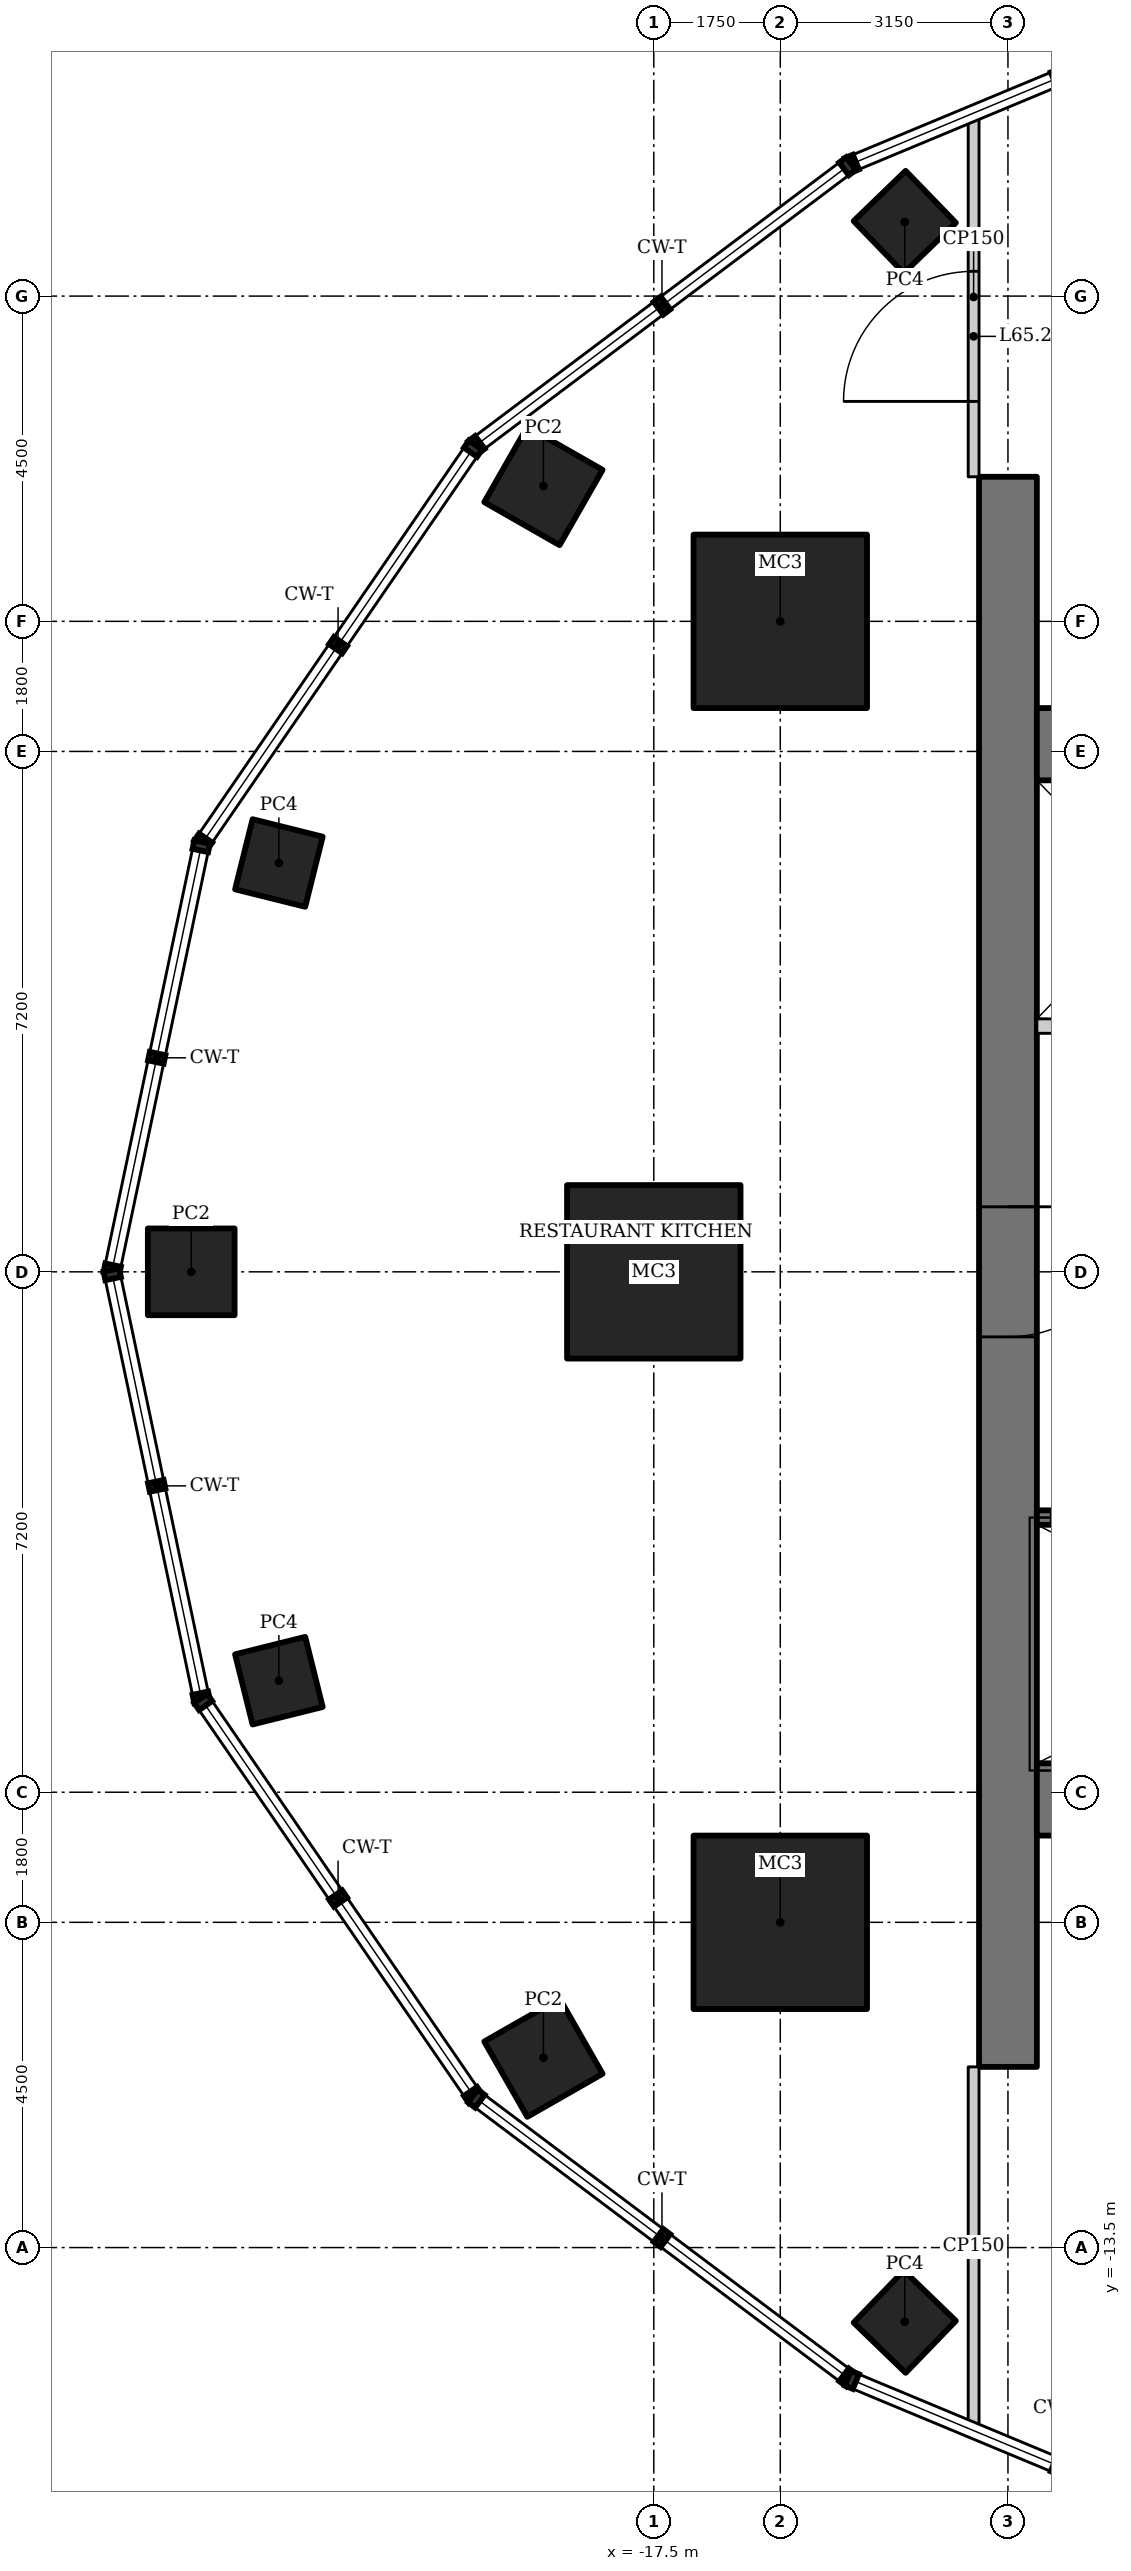
"""IFC4 building model, lengths in metres.
Left out: names, types, materials, properties, quantities, classifications, styles, units other than length and angle.
Written with IfcOpenShell. Run it as: python <this file> out.ifc"""

import sys

from ifc_helpers import new_model, si_unit, direction, frame, frame_2d, origin, origin_2d, place, context, subcontext, project, spatial, rectangle, hollow_rectangle, extrude, element, fill, save


model = new_model("IFC4")
c1 = context("Model", 3, precision=1e-05, world=origin(), true_north=direction((0.0, 1.0)))
c2 = subcontext(c1, "Body", "Model", "MODEL_VIEW")
j1 = project(units=[si_unit("LENGTHUNIT", "METRE"), si_unit("PLANEANGLEUNIT", "RADIAN")], contexts=[c1])
p1 = place(None, origin())
s1 = spatial("IfcSite", under=j1, at=p1, CompositionType="ELEMENT")
p2 = place(p1, origin())
s2 = spatial("IfcBuilding", under=s1, at=p2, CompositionType="ELEMENT")
p3 = place(p2, frame((0.0, 0.0, 279.4)))
s3 = spatial("IfcBuildingStorey", under=s2, at=p3, CompositionType="ELEMENT", Elevation=279.4)
for number, where, z_axis, x_axis in (
    (1, (-15.75, 9.0, 0.0), (0.0, 0.0, 1.0), (1.0, 0.0, 0.0)),
    (2, (-17.5, 0.0, 0.0), (0.0, 0.0, 1.0), (1.0, 0.0, 0.0)),
    (3, (-15.75, -9.0, 0.0), (0.0, 0.0, 1.0), (1.0, 0.0, 0.0)),
):
    element("IfcColumn", number, at=place(p3, frame(where, z_axis=z_axis, x_axis=x_axis)), inside=s3, PredefinedType="COLUMN", context=c2, shape_type="SweptSolid", body=[
        extrude(hollow_rectangle(XDim=2.4, YDim=2.4, WallThickness=0.12, at=origin_2d()), origin(), (0.0, 0.0, 1.0), 5.0),
    ])
p4 = place(p3, frame((-14.028, 14.526, 0.0), z_axis=(0.0, 0.0, 1.0), x_axis=(0.719339800339, 0.694658370459, 0.0)))
e4 = element("IfcColumn", 4, at=p4, inside=s3, PredefinedType="COLUMN", context=c2, shape_type="SweptSolid", body=[
    extrude(hollow_rectangle(XDim=1.0, YDim=1.0, WallThickness=0.08, at=origin_2d()), origin(), (0.0, 0.0, 1.0), 5.0),
])
p5 = place(p3, frame((-19.027, 10.873, 0.0), z_axis=(0.0, 0.0, 1.0), x_axis=(0.496139221777, 0.86824298017, 0.0)))
e5 = element("IfcColumn", 5, at=p5, inside=s3, PredefinedType="COLUMN", context=c2, shape_type="SweptSolid", body=[
    extrude(hollow_rectangle(XDim=1.2, YDim=1.2, WallThickness=0.1, at=origin_2d()), origin(), (0.0, 0.0, 1.0), 5.0),
])
p6 = place(p3, frame((-22.687, 5.656, 0.0), z_axis=(0.0, 0.0, 1.0), x_axis=(0.2419218956, 0.970295726276, 0.0)))
e6 = element("IfcColumn", 6, at=p6, inside=s3, PredefinedType="COLUMN", context=c2, shape_type="SweptSolid", body=[
    extrude(hollow_rectangle(XDim=1.0, YDim=1.0, WallThickness=0.08, at=origin_2d()), origin(), (0.0, 0.0, 1.0), 5.0),
])
p7 = place(p3, frame((-23.9, 0.0, 0.0), z_axis=(0.0, 0.0, 1.0), x_axis=(1.0, 0.0, 0.0)))
e7 = element("IfcColumn", 7, at=p7, inside=s3, PredefinedType="COLUMN", context=c2, shape_type="SweptSolid", body=[
    extrude(hollow_rectangle(XDim=1.2, YDim=1.2, WallThickness=0.1, at=origin_2d()), origin(), (0.0, 0.0, 1.0), 5.0),
])
p8 = place(p3, frame((-22.687, -5.656, 0.0), z_axis=(0.0, 0.0, 1.0), x_axis=(0.970295726276, 0.2419218956, 0.0)))
e8 = element("IfcColumn", 8, at=p8, inside=s3, PredefinedType="COLUMN", context=c2, shape_type="SweptSolid", body=[
    extrude(hollow_rectangle(XDim=1.0, YDim=1.0, WallThickness=0.08, at=origin_2d()), origin(), (0.0, 0.0, 1.0), 5.0),
])
p9 = place(p3, frame((-19.027, -10.873, 0.0), z_axis=(0.0, 0.0, 1.0), x_axis=(0.86824298017, 0.496139221777, 0.0)))
e9 = element("IfcColumn", 9, at=p9, inside=s3, PredefinedType="COLUMN", context=c2, shape_type="SweptSolid", body=[
    extrude(hollow_rectangle(XDim=1.2, YDim=1.2, WallThickness=0.1, at=origin_2d()), origin(), (0.0, 0.0, 1.0), 5.0),
])
p10 = place(p3, frame((-14.028, -14.526, 0.0), z_axis=(0.0, 0.0, 1.0), x_axis=(0.694658370459, 0.719339800339, 0.0)))
e10 = element("IfcColumn", 10, at=p10, inside=s3, PredefinedType="COLUMN", context=c2, shape_type="SweptSolid", body=[
    extrude(hollow_rectangle(XDim=1.0, YDim=1.0, WallThickness=0.08, at=origin_2d()), origin(), (0.0, 0.0, 1.0), 5.0),
])
p11 = place(p3, frame((-12.6, 11.0, 0.0), z_axis=(0.0, 0.0, 1.0), x_axis=(0.0, -1.0, 0.0)))
e11 = element("IfcWall", 11, at=p11, inside=s3, PredefinedType="SHEAR", context=c2, shape_type="SweptSolid", body=[
    extrude(rectangle(XDim=22.0, YDim=0.8, at=frame_2d((11.0, 0.0))), origin(), (0.0, 0.0, 1.0), 5.0),
])
p12 = place(p11, frame((10.1, 0.0, 0.0)))
e12 = element("IfcOpeningElement", 12, at=p12, cuts=e11, PredefinedType="OPENING", context=c2, shape_type="SweptSolid", body=[
    extrude(rectangle(XDim=1.8, YDim=2.1, at=frame_2d((0.9, 1.05))), frame((0.0, 0.41, 0.0), z_axis=(0.0, -1.0, 0.0), x_axis=(1.0, 0.0, 0.0)), (0.0, 0.0, 1.0), 0.82),
])
p13 = place(p3, frame((-12.2, -7.3, 0.0), z_axis=(0.0, 0.0, 1.0), x_axis=(1.0, 0.0, 0.0)))
e13 = element("IfcWall", 13, at=p13, inside=s3, PredefinedType="SHEAR", context=c2, shape_type="SweptSolid", body=[
    extrude(rectangle(XDim=24.4, YDim=1.0, at=frame_2d((12.2, 0.0))), origin(), (0.0, 0.0, 1.0), 5.0),
])
p14 = place(p3, frame((-5.6, 7.3, 0.0), z_axis=(0.0, 0.0, 1.0), x_axis=(-1.0, 0.0, 0.0)))
e14 = element("IfcWall", 14, at=p14, inside=s3, PredefinedType="SHEAR", context=c2, shape_type="SweptSolid", body=[
    extrude(rectangle(XDim=6.6, YDim=1.0, at=frame_2d((3.3, 0.0))), origin(), (0.0, 0.0, 1.0), 5.0),
])
p15 = place(p3, frame((-5.6, -3.4, 0.0), z_axis=(0.0, 0.0, 1.0), x_axis=(-1.0, 0.0, 0.0)))
e15 = element("IfcWall", 15, at=p15, inside=s3, PredefinedType="SHEAR", context=c2, shape_type="SweptSolid", body=[
    extrude(rectangle(XDim=6.6, YDim=0.2, at=frame_2d((3.3, 0.0))), origin(), (0.0, 0.0, 1.0), 5.0),
])
p16 = place(p15, frame((5.2, 0.0, 0.0)))
e16 = element("IfcOpeningElement", 16, at=p16, cuts=e15, PredefinedType="OPENING", context=c2, shape_type="SweptSolid", body=[
    extrude(rectangle(XDim=1.2, YDim=2.1, at=frame_2d((0.6, 1.05))), frame((0.0, 0.11, 0.0), z_axis=(0.0, -1.0, 0.0), x_axis=(1.0, 0.0, 0.0)), (0.0, 0.0, 1.0), 0.22),
])
p17 = place(p3, frame((-12.2, 3.4, 0.0), z_axis=(0.0, 0.0, 1.0), x_axis=(1.0, 0.0, 0.0)))
e17 = element("IfcWall", 17, at=p17, inside=s3, PredefinedType="SOLIDWALL", context=c2, shape_type="SweptSolid", body=[
    extrude(rectangle(XDim=6.6, YDim=0.2, at=frame_2d((3.3, 0.0))), origin(), (0.0, 0.0, 1.0), 5.0),
])
p18 = place(p17, frame((1.05, 0.0, 0.0)))
e18 = element("IfcOpeningElement", 18, at=p18, cuts=e17, PredefinedType="OPENING", context=c2, shape_type="SweptSolid", body=[
    extrude(rectangle(XDim=1.1, YDim=2.2, at=frame_2d((0.55, 1.1))), frame((0.0, 0.11, 0.0), z_axis=(0.0, -1.0, 0.0), x_axis=(1.0, 0.0, 0.0)), (0.0, 0.0, 1.0), 0.22),
])
p19 = place(p17, frame((4.3, 0.0, 0.0)))
e19 = element("IfcOpeningElement", 19, at=p19, cuts=e17, PredefinedType="OPENING", context=c2, shape_type="SweptSolid", body=[
    extrude(rectangle(XDim=1.4, YDim=2.2, at=frame_2d((0.7, 1.1))), frame((0.0, 0.11, 0.0), z_axis=(0.0, -1.0, 0.0), x_axis=(1.0, 0.0, 0.0)), (0.0, 0.0, 1.0), 0.22),
])
p20 = place(p3, frame((-13.075, -11.0, 0.0), z_axis=(0.0, 0.0, 1.0), x_axis=(0.0, -1.0, 0.0)))
e20 = element("IfcWall", 20, at=p20, inside=s3, PredefinedType="PARTITIONING", context=c2, shape_type="SweptSolid", body=[
    extrude(rectangle(XDim=4.974, YDim=0.15, at=frame_2d((2.487, 0.0))), origin(), (0.0, 0.0, 1.0), 4.8),
])
p21 = place(p3, frame((-13.075, 11.0, 0.0), z_axis=(0.0, 0.0, 1.0), x_axis=(0.0, 1.0, 0.0)))
e21 = element("IfcWall", 21, at=p21, inside=s3, PredefinedType="PARTITIONING", context=c2, shape_type="SweptSolid", body=[
    extrude(rectangle(XDim=4.974, YDim=0.15, at=frame_2d((2.487, 0.0))), origin(), (0.0, 0.0, 1.0), 4.8),
])
p22 = place(p21, frame((1.043, 0.0, 0.0)))
e22 = element("IfcOpeningElement", 22, at=p22, cuts=e21, PredefinedType="OPENING", context=c2, shape_type="SweptSolid", body=[
    extrude(rectangle(XDim=1.8, YDim=2.1, at=frame_2d((0.9, 1.05))), frame((0.0, 0.085, 0.0), z_axis=(0.0, -1.0, 0.0), x_axis=(1.0, 0.0, 0.0)), (0.0, 0.0, 1.0), 0.17),
])
p23 = place(p16, origin())
e23 = element("IfcDoor", 23, at=p23, inside=s3, OperationType="SINGLE_SWING_RIGHT", PredefinedType="DOOR", context=c2, shape_type="SweptSolid", body=[
    extrude(rectangle(XDim=1.2, YDim=2.1, at=frame_2d((0.6, 1.05))), frame((0.0, 0.025, 0.0), z_axis=(0.0, -1.0, 0.0), x_axis=(1.0, 0.0, 0.0)), (0.0, 0.0, 1.0), 0.05),
])
fill(e16, e23)
p24 = place(p12, origin())
e24 = element("IfcDoor", 24, at=p24, inside=s3, OperationType="DOUBLE_DOOR_DOUBLE_SWING", PredefinedType="DOOR", context=c2, shape_type="SweptSolid", body=[
    extrude(rectangle(XDim=1.8, YDim=2.1, at=frame_2d((0.9, 1.05))), frame((0.0, 0.025, 0.0), z_axis=(0.0, -1.0, 0.0), x_axis=(1.0, 0.0, 0.0)), (0.0, 0.0, 1.0), 0.05),
])
fill(e12, e24)
p25 = place(p22, origin())
e25 = element("IfcDoor", 25, at=p25, inside=s3, OperationType="DOUBLE_DOOR_DOUBLE_SWING", PredefinedType="DOOR", context=c2, shape_type="SweptSolid", body=[
    extrude(rectangle(XDim=1.8, YDim=2.1, at=frame_2d((0.9, 1.05))), frame((0.0, 0.025, 0.0), z_axis=(0.0, -1.0, 0.0), x_axis=(1.0, 0.0, 0.0)), (0.0, 0.0, 1.0), 0.05),
])
fill(e22, e25)
save(model, sys.argv[1])
